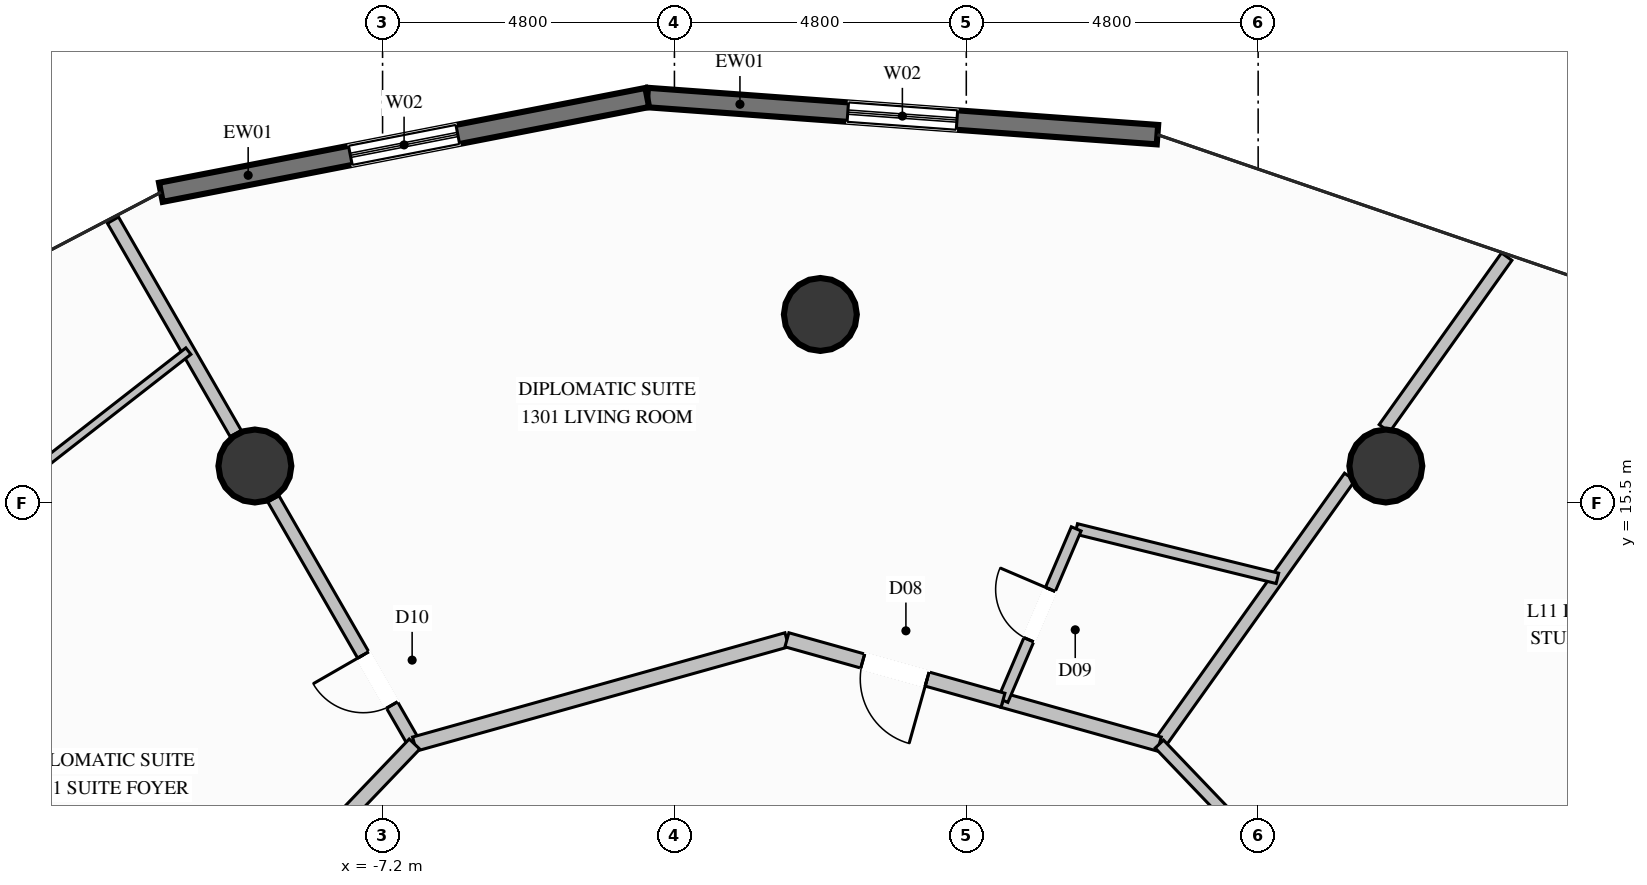
"""IFC4 building model, lengths in metres.
Left out: names, types, materials, properties, quantities, classifications, styles, units other than length and angle.
Written with IfcOpenShell. Run it as: python <this file> out.ifc"""

import sys

from ifc_helpers import new_model, si_unit, direction, frame, frame_2d, origin, origin_2d, place, context, subcontext, project, spatial, rectangle, circle, extrude, element, fill, save


model = new_model("IFC4")
c1 = context("Model", 3, precision=1e-05, world=origin(), true_north=direction((0.0, 1.0)))
c2 = subcontext(c1, "Body", "Model", "MODEL_VIEW")
j1 = project(units=[si_unit("LENGTHUNIT", "METRE"), si_unit("PLANEANGLEUNIT", "RADIAN")], contexts=[c1])
p1 = place(None, origin())
s1 = spatial("IfcSite", under=j1, at=p1, CompositionType="ELEMENT")
p2 = place(p1, origin())
s2 = spatial("IfcBuilding", under=s1, at=p2, CompositionType="ELEMENT")
p3 = place(p2, frame((0.0, 0.0, 50.0)))
s3 = spatial("IfcBuildingStorey", under=s2, at=p3, CompositionType="ELEMENT", Elevation=50.0)
for number, where, z_axis, x_axis in (
    (1, (9.3, 16.108, 0.0), (0.0, 0.0, 1.0), (1.0, 0.0, 0.0)),
    (2, (0.0, 18.6, 0.0), (0.0, 0.0, 1.0), (1.0, 0.0, 0.0)),
    (3, (-9.3, 16.108, 0.0), (0.0, 0.0, 1.0), (1.0, 0.0, 0.0)),
):
    element("IfcColumn", number, at=place(p3, frame(where, z_axis=z_axis, x_axis=x_axis)), inside=s3, PredefinedType="COLUMN", context=c2, shape_type="SweptSolid", body=[
        extrude(circle(Radius=0.6, at=origin_2d()), origin(), (0.0, 0.0, 1.0), 3.6),
    ])
p4 = place(p3, frame((-2.847, 22.168, 0.0), z_axis=(0.0, 0.0, 1.0), x_axis=(0.997358597799, -0.072634891044, 0.0)))
e4 = element("IfcWall", 4, at=p4, inside=s3, PredefinedType="SOLIDWALL", context=c2, shape_type="SweptSolid", body=[
    extrude(rectangle(XDim=8.413, YDim=0.32, at=frame_2d((4.207, 0.0))), origin(), (0.0, 0.0, 1.0), 3.34),
])
p5 = place(p4, frame((3.307, 0.0, 0.35)))
e5 = element("IfcOpeningElement", 5, at=p5, cuts=e4, PredefinedType="OPENING", context=c2, shape_type="SweptSolid", body=[
    extrude(rectangle(XDim=1.8, YDim=2.6, at=frame_2d((0.9, 1.3))), frame((0.0, 0.17, 0.0), z_axis=(0.0, -1.0, 0.0), x_axis=(1.0, 0.0, 0.0)), (0.0, 0.0, 1.0), 0.34),
])
p6 = place(p3, frame((-10.846, 20.609, 0.0), z_axis=(0.0, 0.0, 1.0), x_axis=(0.981529850993, 0.191309047382, 0.0)))
e6 = element("IfcWall", 6, at=p6, inside=s3, PredefinedType="SOLIDWALL", context=c2, shape_type="SweptSolid", body=[
    extrude(rectangle(XDim=8.15, YDim=0.32, at=frame_2d((4.075, 0.0))), origin(), (0.0, 0.0, 1.0), 3.34),
])
p7 = place(p6, frame((3.175, 0.0, 0.35)))
e7 = element("IfcOpeningElement", 7, at=p7, cuts=e6, PredefinedType="OPENING", context=c2, shape_type="SweptSolid", body=[
    extrude(rectangle(XDim=1.8, YDim=2.6, at=frame_2d((0.9, 1.3))), frame((0.0, 0.17, 0.0), z_axis=(0.0, -1.0, 0.0), x_axis=(1.0, 0.0, 0.0)), (0.0, 0.0, 1.0), 0.34),
])
p8 = place(p3, frame((5.575, 11.535, 0.0), z_axis=(0.0, 0.0, 1.0), x_axis=(0.580317556577, 0.814390283297, 0.0)))
e8 = element("IfcWall", 8, at=p8, inside=s3, PredefinedType="PARTITIONING", context=c2, shape_type="SweptSolid", body=[
    extrude(rectangle(XDim=5.396, YDim=0.21, at=frame_2d((2.698, 0.0))), origin(), (0.0, 0.0, 1.0), 2.708),
])
p9 = place(p3, frame((9.276, 16.728, 0.0), z_axis=(0.0, 0.0, 1.0), x_axis=(0.580431843094, 0.814308833013, 0.0)))
e9 = element("IfcWall", 9, at=p9, inside=s3, PredefinedType="PARTITIONING", context=c2, shape_type="SweptSolid", body=[
    extrude(rectangle(XDim=3.467, YDim=0.21, at=frame_2d((1.733, 0.0))), origin(), (0.0, 0.0, 1.0), 3.34),
])
p10 = place(p3, frame((-6.675, 11.535, 0.0), z_axis=(0.0, 0.0, 1.0), x_axis=(-0.498786523098, 0.866724872365, 0.0)))
e10 = element("IfcWall", 10, at=p10, inside=s3, PredefinedType="PARTITIONING", context=c2, shape_type="SweptSolid", body=[
    extrude(rectangle(XDim=4.653, YDim=0.21, at=frame_2d((2.327, 0.0))), origin(), (0.0, 0.0, 1.0), 2.708),
])
p11 = place(p10, frame((0.741, 0.0, 0.0)))
e11 = element("IfcOpeningElement", 11, at=p11, cuts=e10, PredefinedType="OPENING", context=c2, shape_type="SweptSolid", body=[
    extrude(rectangle(XDim=0.95, YDim=2.1, at=frame_2d((0.475, 1.05))), frame((0.0, 0.115, 0.0), z_axis=(0.0, -1.0, 0.0), x_axis=(1.0, 0.0, 0.0)), (0.0, 0.0, 1.0), 0.23),
])
p12 = place(p3, frame((-9.615, 16.642, 0.0), z_axis=(0.0, 0.0, 1.0), x_axis=(-0.498747569817, 0.8667472882, 0.0)))
e12 = element("IfcWall", 12, at=p12, inside=s3, PredefinedType="PARTITIONING", context=c2, shape_type="SweptSolid", body=[
    extrude(rectangle(XDim=4.048, YDim=0.21, at=frame_2d((2.024, 0.0))), origin(), (0.0, 0.0, 1.0), 3.34),
])
p13 = place(p3, frame((5.575, 11.535, 0.0), z_axis=(0.0, 0.0, 1.0), x_axis=(-0.962983004146, 0.269562114782, 0.0)))
e13 = element("IfcWall", 13, at=p13, inside=s3, PredefinedType="PARTITIONING", context=c2, shape_type="SweptSolid", body=[
    extrude(rectangle(XDim=2.671, YDim=0.24, at=frame_2d((1.335, 0.0))), origin(), (0.0, 0.0, 1.0), 2.919),
])
p14 = place(p3, frame((7.517, 14.26, 0.0), z_axis=(0.0, 0.0, 1.0), x_axis=(-0.971054260807, 0.238859001441, 0.0)))
e14 = element("IfcWall", 14, at=p14, inside=s3, PredefinedType="PLUMBINGWALL", context=c2, shape_type="SweptSolid", body=[
    extrude(rectangle(XDim=3.408, YDim=0.175, at=frame_2d((1.704, 0.0))), origin(), (0.0, 0.0, 1.0), 3.34),
])
p15 = place(p3, frame((3.003, 12.255, 0.0), z_axis=(0.0, 0.0, 1.0), x_axis=(0.393063770017, 0.919511214016, 0.0)))
e15 = element("IfcWall", 15, at=p15, inside=s3, PredefinedType="PLUMBINGWALL", context=c2, shape_type="SweptSolid", body=[
    extrude(rectangle(XDim=3.066, YDim=0.175, at=frame_2d((1.533, 0.0))), origin(), (0.0, 0.0, 1.0), 3.34),
])
p16 = place(p15, frame((1.083, 0.0, 0.0)))
e16 = element("IfcOpeningElement", 16, at=p16, cuts=e15, PredefinedType="OPENING", context=c2, shape_type="SweptSolid", body=[
    extrude(rectangle(XDim=0.9, YDim=2.1, at=frame_2d((0.45, 1.05))), frame((0.0, 0.098, 0.0), z_axis=(0.0, -1.0, 0.0), x_axis=(1.0, 0.0, 0.0)), (0.0, 0.0, 1.0), 0.195),
])
p17 = place(p3, frame((-0.55, 13.25, 0.0), z_axis=(0.0, 0.0, 1.0), x_axis=(-0.962960431872, -0.269642738915, 0.0)))
e17 = element("IfcWall", 17, at=p17, inside=s3, PredefinedType="PARTITIONING", context=c2, shape_type="SweptSolid", body=[
    extrude(rectangle(XDim=6.361, YDim=0.24, at=frame_2d((3.18, 0.0))), origin(), (0.0, 0.0, 1.0), 2.919),
])
p18 = place(p3, frame((3.003, 12.255, 0.0), z_axis=(0.0, 0.0, 1.0), x_axis=(-0.962944088122, 0.269701099648, 0.0)))
e18 = element("IfcWall", 18, at=p18, inside=s3, PredefinedType="PARTITIONING", context=c2, shape_type="SweptSolid", body=[
    extrude(rectangle(XDim=3.69, YDim=0.24, at=frame_2d((1.845, 0.0))), origin(), (0.0, 0.0, 1.0), 2.919),
])
p19 = place(p18, frame((1.295, 0.0, 0.0)))
e19 = element("IfcOpeningElement", 19, at=p19, cuts=e18, PredefinedType="OPENING", context=c2, shape_type="SweptSolid", body=[
    extrude(rectangle(XDim=1.1, YDim=2.3, at=frame_2d((0.55, 1.15))), frame((0.0, 0.13, 0.0), z_axis=(0.0, -1.0, 0.0), x_axis=(1.0, 0.0, 0.0)), (0.0, 0.0, 1.0), 0.26),
])
p20 = place(p3, frame((-6.675, 11.535, 0.0), z_axis=(0.0, 0.0, 1.0), x_axis=(-0.691444859665, -0.722429239471, 0.0)))
e20 = element("IfcWall", 20, at=p20, inside=s3, PredefinedType="PARTITIONING", context=c2, shape_type="SweptSolid", body=[
    extrude(rectangle(XDim=6.485, YDim=0.24, at=frame_2d((3.242, 0.0))), origin(), (0.0, 0.0, 1.0), 3.34),
])
p21 = place(p3, frame((-10.394, 17.997, 0.0), z_axis=(0.0, 0.0, 1.0), x_axis=(-0.788726154844, -0.614744705276, 0.0)))
e21 = element("IfcWall", 21, at=p21, inside=s3, PredefinedType="PARTITIONING", context=c2, shape_type="SweptSolid", body=[
    extrude(rectangle(XDim=11.115, YDim=0.135, at=frame_2d((5.558, 0.0))), origin(), (0.0, 0.0, 1.0), 3.34),
])
p22 = place(p21, frame((5.083, 0.0, 0.0)))
e22 = element("IfcOpeningElement", 22, at=p22, cuts=e21, PredefinedType="OPENING", context=c2, shape_type="SweptSolid", body=[
    extrude(rectangle(XDim=0.95, YDim=2.1, at=frame_2d((0.475, 1.05))), frame((0.0, 0.078, 0.0), z_axis=(0.0, -1.0, 0.0), x_axis=(1.0, 0.0, 0.0)), (0.0, 0.0, 1.0), 0.155),
])
p23 = place(p3, frame((10.059, 6.85, 0.0), z_axis=(0.0, 0.0, 1.0), x_axis=(-0.691464507588, 0.722410433719, 0.0)))
e23 = element("IfcWall", 23, at=p23, inside=s3, PredefinedType="PARTITIONING", context=c2, shape_type="SweptSolid", body=[
    extrude(rectangle(XDim=6.485, YDim=0.19, at=frame_2d((3.242, 0.0))), origin(), (0.0, 0.0, 1.0), 3.34),
])
p24 = place(p23, frame((2.768, 0.0, 0.0)))
e24 = element("IfcOpeningElement", 24, at=p24, cuts=e23, PredefinedType="OPENING", context=c2, shape_type="SweptSolid", body=[
    extrude(rectangle(XDim=0.95, YDim=2.1, at=frame_2d((0.475, 1.05))), frame((0.0, 0.105, 0.0), z_axis=(0.0, -1.0, 0.0), x_axis=(1.0, 0.0, 0.0)), (0.0, 0.0, 1.0), 0.21),
])
p25 = place(p5, origin())
e25 = element("IfcWindow", 25, at=p25, inside=s3, PartitioningType="SINGLE_PANEL", PredefinedType="WINDOW", context=c2, shape_type="SweptSolid", body=[
    extrude(rectangle(XDim=1.8, YDim=2.6, at=frame_2d((0.9, 1.3))), frame((0.0, 0.03, 0.0), z_axis=(0.0, -1.0, 0.0), x_axis=(1.0, 0.0, 0.0)), (0.0, 0.0, 1.0), 0.06),
])
fill(e5, e25)
p26 = place(p7, origin())
e26 = element("IfcWindow", 26, at=p26, inside=s3, PartitioningType="SINGLE_PANEL", PredefinedType="WINDOW", context=c2, shape_type="SweptSolid", body=[
    extrude(rectangle(XDim=1.8, YDim=2.6, at=frame_2d((0.9, 1.3))), frame((0.0, 0.03, 0.0), z_axis=(0.0, -1.0, 0.0), x_axis=(1.0, 0.0, 0.0)), (0.0, 0.0, 1.0), 0.06),
])
fill(e7, e26)
p27 = place(p16, origin())
e27 = element("IfcDoor", 27, at=p27, inside=s3, OperationType="SINGLE_SWING_RIGHT", PredefinedType="DOOR", context=c2, shape_type="SweptSolid", body=[
    extrude(rectangle(XDim=0.9, YDim=2.1, at=frame_2d((0.45, 1.05))), frame((0.0, 0.025, 0.0), z_axis=(0.0, -1.0, 0.0), x_axis=(1.0, 0.0, 0.0)), (0.0, 0.0, 1.0), 0.05),
])
fill(e16, e27)
p28 = place(p19, origin())
e28 = element("IfcDoor", 28, at=p28, inside=s3, OperationType="SINGLE_SWING_LEFT", PredefinedType="DOOR", context=c2, shape_type="SweptSolid", body=[
    extrude(rectangle(XDim=1.1, YDim=2.3, at=frame_2d((0.55, 1.15))), frame((0.0, 0.025, 0.0), z_axis=(0.0, -1.0, 0.0), x_axis=(1.0, 0.0, 0.0)), (0.0, 0.0, 1.0), 0.05),
])
fill(e19, e28)
p29 = place(p11, origin())
e29 = element("IfcDoor", 29, at=p29, inside=s3, OperationType="SINGLE_SWING_RIGHT", PredefinedType="DOOR", context=c2, shape_type="SweptSolid", body=[
    extrude(rectangle(XDim=0.95, YDim=2.1, at=frame_2d((0.475, 1.05))), frame((0.0, 0.025, 0.0), z_axis=(0.0, -1.0, 0.0), x_axis=(1.0, 0.0, 0.0)), (0.0, 0.0, 1.0), 0.05),
])
fill(e11, e29)
save(model, sys.argv[1])
